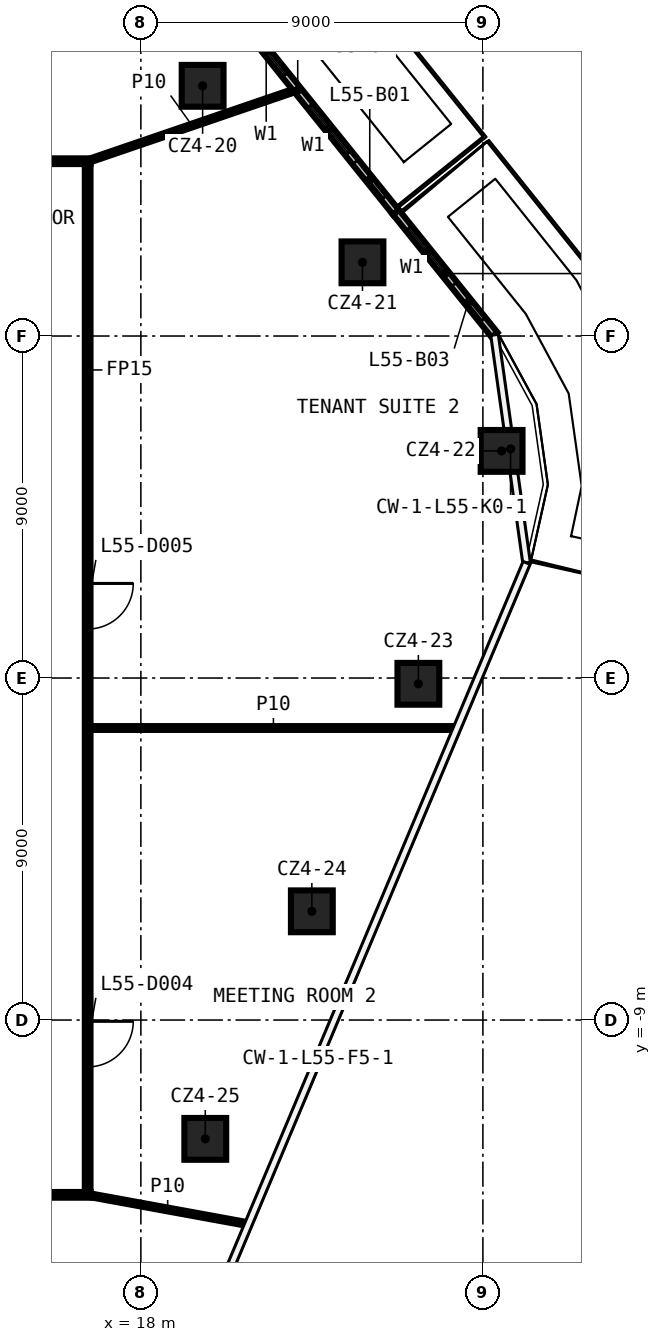
"""IFC4 building model, lengths in metres.
Left out: names, types, materials, properties, quantities, classifications, styles, units other than length and angle.
Written with IfcOpenShell. Run it as: python <this file> out.ifc"""

import sys

from ifc_helpers import new_model, si_unit, direction, frame, frame_2d, origin, origin_2d, place, context, subcontext, project, spatial, rectangle, extrude, element, fill, save


model = new_model("IFC4")
c1 = context("Model", 3, precision=1e-05, world=origin(), true_north=direction((0.0, 1.0)))
c2 = subcontext(c1, "Body", "Model", "MODEL_VIEW")
j1 = project(units=[si_unit("LENGTHUNIT", "METRE"), si_unit("PLANEANGLEUNIT", "RADIAN")], contexts=[c1])
p1 = place(None, origin())
s1 = spatial("IfcSite", under=j1, at=p1, CompositionType="ELEMENT")
p2 = place(p1, origin())
s2 = spatial("IfcBuilding", under=s1, at=p2, CompositionType="ELEMENT")
p3 = place(p2, frame((0.0, 0.0, 262.2)))
s3 = spatial("IfcBuildingStorey", under=s2, at=p3, CompositionType="ELEMENT", Elevation=262.2)
for number, where, z_axis, x_axis in (
    (1, (19.625, 15.584, 0.0), (0.0, 0.0, 1.0), (1.0, 0.0, 0.0)),
    (2, (23.831, 10.939, 0.0), (0.0, 0.0, 1.0), (1.0, 0.0, 0.0)),
    (3, (27.492, 5.977, 0.0), (0.0, 0.0, 1.0), (1.0, 0.0, 0.0)),
    (4, (25.302, -0.152, 0.0), (0.0, 0.0, 1.0), (1.0, 0.0, 0.0)),
    (5, (22.499, -6.139, 0.0), (0.0, 0.0, 1.0), (1.0, 0.0, 0.0)),
    (6, (19.695, -12.127, 0.0), (0.0, 0.0, 1.0), (1.0, 0.0, 0.0)),
):
    element("IfcColumn", number, at=place(p3, frame(where, z_axis=z_axis, x_axis=x_axis)), inside=s3, PredefinedType="COLUMN", context=c2, shape_type="SweptSolid", body=[
        extrude(rectangle(XDim=1.1, YDim=1.1, at=origin_2d()), origin(), (0.0, 0.0, 1.0), 3.82),
    ])
p4 = place(p3, frame((16.675, -13.6, 0.0), z_axis=(0.0, 0.0, 1.0), x_axis=(-1.0, 0.0, 0.0)))
e7 = element("IfcWall", 7, at=p4, inside=s3, PredefinedType="PARTITIONING", context=c2, shape_type="SweptSolid", body=[
    extrude(rectangle(XDim=32.75, YDim=0.15, at=frame_2d((16.375, 0.0))), origin(), (0.0, 0.0, 1.0), 3.82),
])
p5 = place(p4, frame((29.587, 0.0, 0.0)))
e8 = element("IfcOpeningElement", 8, at=p5, cuts=e7, PredefinedType="OPENING", context=c2, shape_type="SweptSolid", body=[
    extrude(rectangle(XDim=1.2, YDim=2.1, at=frame_2d((0.6, 1.05))), frame((0.0, 0.085, 0.0), z_axis=(0.0, -1.0, 0.0), x_axis=(1.0, 0.0, 0.0)), (0.0, 0.0, 1.0), 0.17),
])
p6 = place(p4, frame((17.04, 0.0, 0.0)))
e9 = element("IfcOpeningElement", 9, at=p6, cuts=e7, PredefinedType="OPENING", context=c2, shape_type="SweptSolid", body=[
    extrude(rectangle(XDim=1.2, YDim=2.1, at=frame_2d((0.6, 1.05))), frame((0.0, 0.085, 0.0), z_axis=(0.0, -1.0, 0.0), x_axis=(1.0, 0.0, 0.0)), (0.0, 0.0, 1.0), 0.17),
])
p7 = place(p4, frame((2.495, 0.0, 0.0)))
e10 = element("IfcOpeningElement", 10, at=p7, cuts=e7, PredefinedType="OPENING", context=c2, shape_type="SweptSolid", body=[
    extrude(rectangle(XDim=1.2, YDim=2.1, at=frame_2d((0.6, 1.05))), frame((0.0, 0.085, 0.0), z_axis=(0.0, -1.0, 0.0), x_axis=(1.0, 0.0, 0.0)), (0.0, 0.0, 1.0), 0.17),
])
p8 = place(p3, frame((16.675, -1.315, 0.0), z_axis=(0.0, 0.0, 1.0), x_axis=(1.0, 0.0, 0.0)))
e11 = element("IfcWall", 11, at=p8, inside=s3, PredefinedType="PARTITIONING", context=c2, shape_type="SweptSolid", body=[
    extrude(rectangle(XDim=9.626, YDim=0.1, at=frame_2d((4.813, 0.0))), origin(), (0.0, 0.0, 1.0), 3.82),
])
p9 = place(p3, frame((-16.075, 13.6, 0.0), z_axis=(0.0, 0.0, 1.0), x_axis=(1.0, 0.0, 0.0)))
e12 = element("IfcWall", 12, at=p9, inside=s3, PredefinedType="PARTITIONING", context=c2, shape_type="SweptSolid", body=[
    extrude(rectangle(XDim=32.75, YDim=0.15, at=frame_2d((16.375, 0.0))), origin(), (0.0, 0.0, 1.0), 3.82),
])
p10 = place(p9, frame((16.43, 0.0, 0.0)))
e13 = element("IfcOpeningElement", 13, at=p10, cuts=e12, PredefinedType="OPENING", context=c2, shape_type="SweptSolid", body=[
    extrude(rectangle(XDim=1.2, YDim=2.1, at=frame_2d((0.6, 1.05))), frame((0.0, 0.085, 0.0), z_axis=(0.0, -1.0, 0.0), x_axis=(1.0, 0.0, 0.0)), (0.0, 0.0, 1.0), 0.17),
])
p11 = place(p9, frame((4.465, 0.0, 0.0)))
e14 = element("IfcOpeningElement", 14, at=p11, cuts=e12, PredefinedType="OPENING", context=c2, shape_type="SweptSolid", body=[
    extrude(rectangle(XDim=1.2, YDim=2.1, at=frame_2d((0.6, 1.05))), frame((0.0, 0.085, 0.0), z_axis=(0.0, -1.0, 0.0), x_axis=(1.0, 0.0, 0.0)), (0.0, 0.0, 1.0), 0.17),
])
p12 = place(p3, frame((16.6, 13.6, 0.0), z_axis=(0.0, 0.0, 1.0), x_axis=(0.946142628781, 0.323750098073, 0.0)))
e15 = element("IfcWall", 15, at=p12, inside=s3, PredefinedType="PARTITIONING", context=c2, shape_type="SweptSolid", body=[
    extrude(rectangle(XDim=5.805, YDim=0.1, at=frame_2d((2.903, 0.0))), origin(), (0.0, 0.0, 1.0), 3.82),
])
p13 = place(p3, frame((16.6, 13.525, 0.0), z_axis=(0.0, 0.0, 1.0), x_axis=(0.0, -1.0, 0.0)))
e16 = element("IfcWall", 16, at=p13, inside=s3, PredefinedType="PARTITIONING", context=c2, shape_type="SweptSolid", body=[
    extrude(rectangle(XDim=27.05, YDim=0.15, at=frame_2d((13.525, 0.0))), origin(), (0.0, 0.0, 1.0), 3.82),
])
p14 = place(p13, frame((22.559, 0.0, 0.0)))
e17 = element("IfcOpeningElement", 17, at=p14, cuts=e16, PredefinedType="OPENING", context=c2, shape_type="SweptSolid", body=[
    extrude(rectangle(XDim=1.2, YDim=2.1, at=frame_2d((0.6, 1.05))), frame((0.0, 0.085, 0.0), z_axis=(0.0, -1.0, 0.0), x_axis=(1.0, 0.0, 0.0)), (0.0, 0.0, 1.0), 0.17),
])
p15 = place(p13, frame((11.036, 0.0, 0.0)))
e18 = element("IfcOpeningElement", 18, at=p15, cuts=e16, PredefinedType="OPENING", context=c2, shape_type="SweptSolid", body=[
    extrude(rectangle(XDim=1.2, YDim=2.1, at=frame_2d((0.6, 1.05))), frame((0.0, 0.085, 0.0), z_axis=(0.0, -1.0, 0.0), x_axis=(1.0, 0.0, 0.0)), (0.0, 0.0, 1.0), 0.17),
])
p16 = place(p3, frame((16.6, -13.6, 0.0), z_axis=(0.0, 0.0, 1.0), x_axis=(0.983699688502, -0.179819139254, 0.0)))
e19 = element("IfcWall", 19, at=p16, inside=s3, PredefinedType="PARTITIONING", context=c2, shape_type="SweptSolid", body=[
    extrude(rectangle(XDim=4.28, YDim=0.1, at=frame_2d((2.14, 0.0))), origin(), (0.0, 0.0, 1.0), 3.82),
])
p17 = place(p3, frame((24.712, 12.255, 0.0), z_axis=(0.0, 0.0, 1.0), x_axis=(-0.626871708653, 0.77912249415, 0.0)))
e20 = element("IfcWall", 20, at=p17, inside=s3, PredefinedType="SOLIDWALL", context=c2, shape_type="SweptSolid", body=[
    extrude(rectangle(XDim=8.293, YDim=0.2, at=frame_2d((4.147, 0.0))), origin(), (0.0, 0.0, 1.0), 3.82),
])
p18 = place(p17, frame((2.0, 0.0, 0.6)))
e21 = element("IfcOpeningElement", 21, at=p18, cuts=e20, PredefinedType="OPENING", context=c2, shape_type="SweptSolid", body=[
    extrude(rectangle(XDim=1.6, YDim=2.4, at=frame_2d((0.8, 1.2))), frame((0.0, 0.11, 0.0), z_axis=(0.0, -1.0, 0.0), x_axis=(1.0, 0.0, 0.0)), (0.0, 0.0, 1.0), 0.22),
])
p19 = place(p17, frame((0.5, 0.0, 0.0)))
e22 = element("IfcOpeningElement", 22, at=p19, cuts=e20, PredefinedType="OPENING", context=c2, shape_type="SweptSolid", body=[
    extrude(rectangle(XDim=1.2, YDim=2.4, at=frame_2d((0.6, 1.2))), frame((0.0, 0.11, 0.0), z_axis=(0.0, -1.0, 0.0), x_axis=(1.0, 0.0, 0.0)), (0.0, 0.0, 1.0), 0.22),
])
p20 = place(p17, frame((4.647, 0.0, 0.6)))
e23 = element("IfcOpeningElement", 23, at=p20, cuts=e20, PredefinedType="OPENING", context=c2, shape_type="SweptSolid", body=[
    extrude(rectangle(XDim=1.6, YDim=2.4, at=frame_2d((0.8, 1.2))), frame((0.0, 0.11, 0.0), z_axis=(0.0, -1.0, 0.0), x_axis=(1.0, 0.0, 0.0)), (0.0, 0.0, 1.0), 0.22),
])
p21 = place(p17, frame((6.547, 0.0, 0.0)))
e24 = element("IfcOpeningElement", 24, at=p21, cuts=e20, PredefinedType="OPENING", context=c2, shape_type="SweptSolid", body=[
    extrude(rectangle(XDim=1.2, YDim=2.4, at=frame_2d((0.6, 1.2))), frame((0.0, 0.11, 0.0), z_axis=(0.0, -1.0, 0.0), x_axis=(1.0, 0.0, 0.0)), (0.0, 0.0, 1.0), 0.22),
])
p22 = place(p3, frame((27.306, 9.031, 0.0), z_axis=(0.0, 0.0, 1.0), x_axis=(-0.626851318776, 0.779138899137, 0.0)))
e25 = element("IfcWall", 25, at=p22, inside=s3, PredefinedType="SOLIDWALL", context=c2, shape_type="SweptSolid", body=[
    extrude(rectangle(XDim=4.138, YDim=0.2, at=frame_2d((2.069, 0.0))), origin(), (0.0, 0.0, 1.0), 3.82),
])
p23 = place(p22, frame((2.0, 0.0, 0.6)))
e26 = element("IfcOpeningElement", 26, at=p23, cuts=e25, PredefinedType="OPENING", context=c2, shape_type="SweptSolid", body=[
    extrude(rectangle(XDim=1.6, YDim=2.4, at=frame_2d((0.8, 1.2))), frame((0.0, 0.11, 0.0), z_axis=(0.0, -1.0, 0.0), x_axis=(1.0, 0.0, 0.0)), (0.0, 0.0, 1.0), 0.22),
])
p24 = place(p22, frame((0.5, 0.0, 0.0)))
e27 = element("IfcOpeningElement", 27, at=p24, cuts=e25, PredefinedType="OPENING", context=c2, shape_type="SweptSolid", body=[
    extrude(rectangle(XDim=1.2, YDim=2.4, at=frame_2d((0.6, 1.2))), frame((0.0, 0.11, 0.0), z_axis=(0.0, -1.0, 0.0), x_axis=(1.0, 0.0, 0.0)), (0.0, 0.0, 1.0), 0.22),
])
p25 = place(p14, origin())
e28 = element("IfcDoor", 28, at=p25, inside=s3, OperationType="SINGLE_SWING_LEFT", PredefinedType="DOOR", context=c2, shape_type="SweptSolid", body=[
    extrude(rectangle(XDim=1.2, YDim=2.1, at=frame_2d((0.6, 1.05))), frame((0.0, 0.025, 0.0), z_axis=(0.0, -1.0, 0.0), x_axis=(1.0, 0.0, 0.0)), (0.0, 0.0, 1.0), 0.05),
])
fill(e17, e28)
p26 = place(p15, origin())
e29 = element("IfcDoor", 29, at=p26, inside=s3, OperationType="SINGLE_SWING_RIGHT", PredefinedType="DOOR", context=c2, shape_type="SweptSolid", body=[
    extrude(rectangle(XDim=1.2, YDim=2.1, at=frame_2d((0.6, 1.05))), frame((0.0, 0.025, 0.0), z_axis=(0.0, -1.0, 0.0), x_axis=(1.0, 0.0, 0.0)), (0.0, 0.0, 1.0), 0.05),
])
fill(e18, e29)
p27 = place(p18, origin())
e30 = element("IfcWindow", 30, at=p27, inside=s3, PartitioningType="SINGLE_PANEL", PredefinedType="WINDOW", context=c2, shape_type="SweptSolid", body=[
    extrude(rectangle(XDim=1.6, YDim=2.4, at=frame_2d((0.8, 1.2))), frame((0.0, 0.03, 0.0), z_axis=(0.0, -1.0, 0.0), x_axis=(1.0, 0.0, 0.0)), (0.0, 0.0, 1.0), 0.06),
])
fill(e21, e30)
p28 = place(p19, origin())
e31 = element("IfcDoor", 31, at=p28, inside=s3, OperationType="SLIDING_TO_LEFT", PredefinedType="DOOR", context=c2, shape_type="SweptSolid", body=[
    extrude(rectangle(XDim=1.2, YDim=2.4, at=frame_2d((0.6, 1.2))), frame((0.0, 0.025, 0.0), z_axis=(0.0, -1.0, 0.0), x_axis=(1.0, 0.0, 0.0)), (0.0, 0.0, 1.0), 0.05),
])
fill(e22, e31)
p29 = place(p20, origin())
e32 = element("IfcWindow", 32, at=p29, inside=s3, PartitioningType="SINGLE_PANEL", PredefinedType="WINDOW", context=c2, shape_type="SweptSolid", body=[
    extrude(rectangle(XDim=1.6, YDim=2.4, at=frame_2d((0.8, 1.2))), frame((0.0, 0.03, 0.0), z_axis=(0.0, -1.0, 0.0), x_axis=(1.0, 0.0, 0.0)), (0.0, 0.0, 1.0), 0.06),
])
fill(e23, e32)
p30 = place(p23, origin())
e33 = element("IfcWindow", 33, at=p30, inside=s3, PartitioningType="SINGLE_PANEL", PredefinedType="WINDOW", context=c2, shape_type="SweptSolid", body=[
    extrude(rectangle(XDim=1.6, YDim=2.4, at=frame_2d((0.8, 1.2))), frame((0.0, 0.03, 0.0), z_axis=(0.0, -1.0, 0.0), x_axis=(1.0, 0.0, 0.0)), (0.0, 0.0, 1.0), 0.06),
])
fill(e26, e33)
p31 = place(p24, origin())
e34 = element("IfcDoor", 34, at=p31, inside=s3, OperationType="SLIDING_TO_LEFT", PredefinedType="DOOR", context=c2, shape_type="SweptSolid", body=[
    extrude(rectangle(XDim=1.2, YDim=2.4, at=frame_2d((0.6, 1.2))), frame((0.0, 0.025, 0.0), z_axis=(0.0, -1.0, 0.0), x_axis=(1.0, 0.0, 0.0)), (0.0, 0.0, 1.0), 0.05),
])
fill(e27, e34)
save(model, sys.argv[1])
